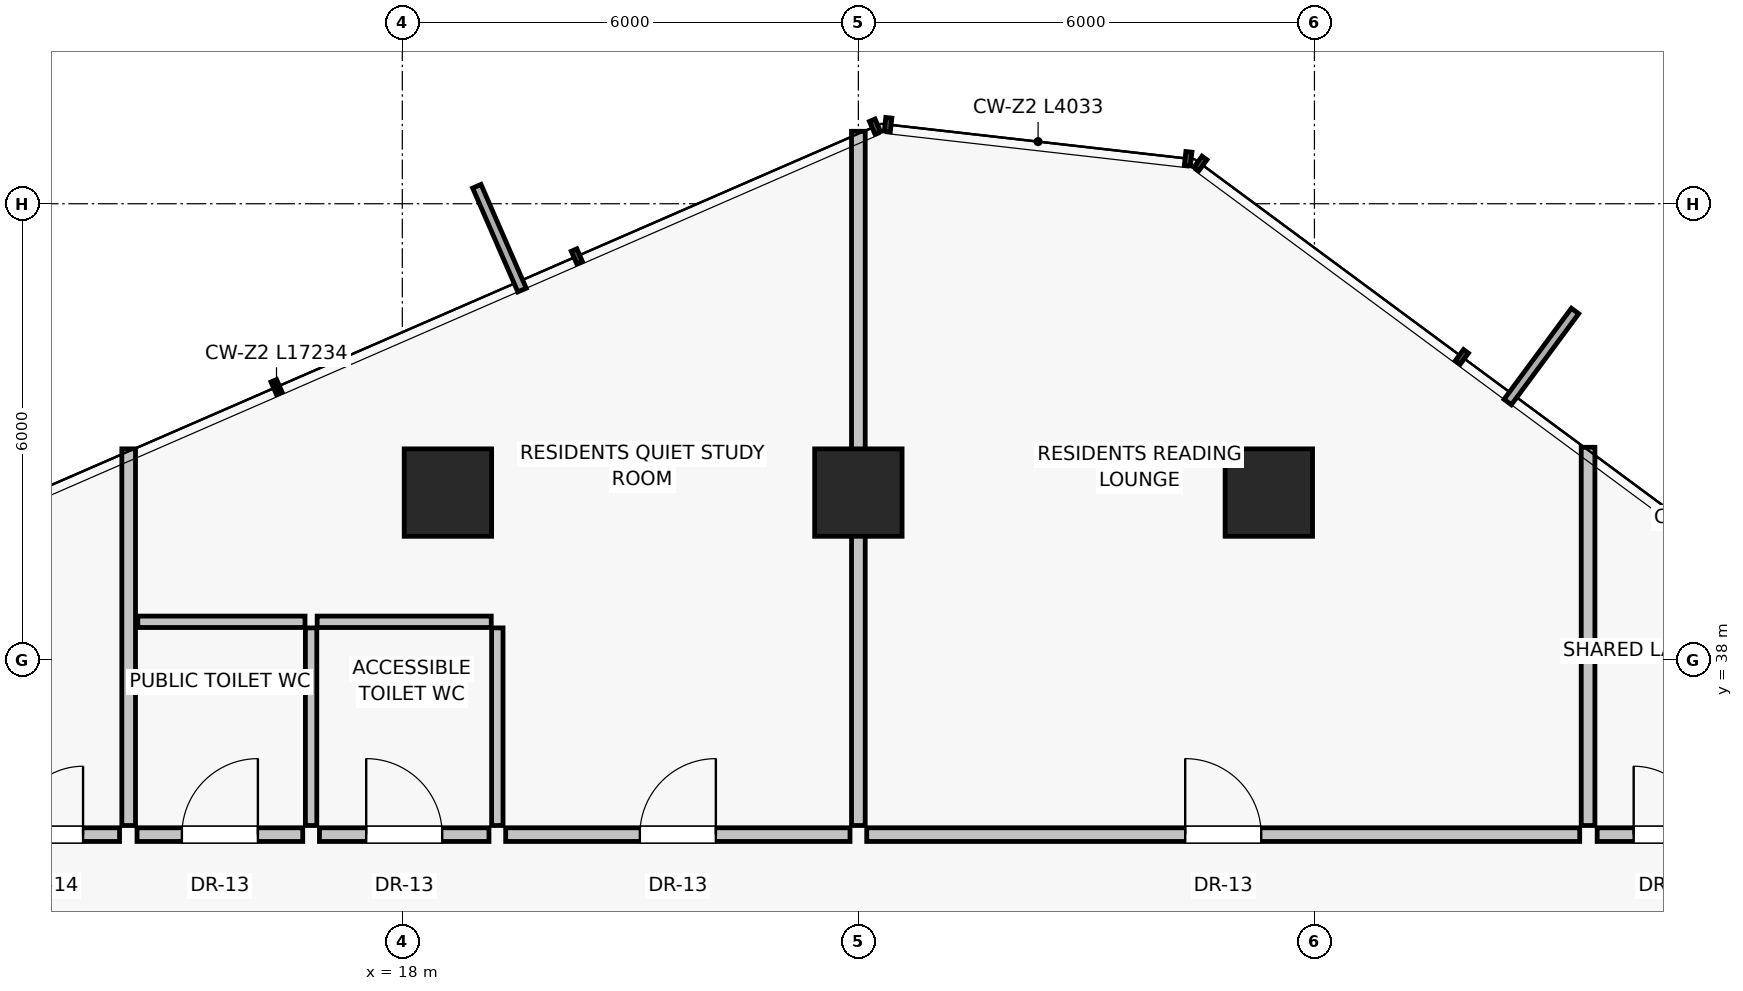
"""IFC4 building model, lengths in metres.
Left out: names, types, materials, properties, quantities, classifications, styles, units other than length and angle.
Written with IfcOpenShell. Run it as: python <this file> out.ifc"""

import sys

from ifc_helpers import new_model, si_unit, direction, frame, frame_2d, origin, origin_2d, place, context, subcontext, project, spatial, rectangle, extrude, source, transform, mapped, element, fill, save


model = new_model("IFC4")
c1 = context("Model", 3, precision=1e-05, world=origin(), true_north=direction((0.0, 1.0)))
c2 = subcontext(c1, "Body", "Model", "MODEL_VIEW")
j1 = project(units=[si_unit("LENGTHUNIT", "METRE"), si_unit("PLANEANGLEUNIT", "RADIAN")], contexts=[c1])
p1 = place(None, origin())
s1 = spatial("IfcSite", under=j1, at=p1, CompositionType="ELEMENT")
p2 = place(p1, origin())
s2 = spatial("IfcBuilding", under=s1, at=p2, CompositionType="ELEMENT")
p3 = place(p2, frame((0.0, 0.0, 105.7)))
s3 = spatial("IfcBuildingStorey", under=s2, at=p3, CompositionType="ELEMENT", Elevation=105.7)
for number, where, z_axis, x_axis in (
    (1, (29.4, 40.2, 0.0), (0.0, 0.0, 1.0), (1.0, 0.0, 0.0)),
    (2, (24.0, 40.2, 0.0), (0.0, 0.0, 1.0), (1.0, 0.0, 0.0)),
    (3, (18.6, 40.2, 0.0), (0.0, 0.0, 1.0), (1.0, 0.0, 0.0)),
):
    element("IfcColumn", number, at=place(p3, frame(where, z_axis=z_axis, x_axis=x_axis)), inside=s3, PredefinedType="COLUMN", context=c2, shape_type="SweptSolid", body=[
        extrude(rectangle(XDim=1.15, YDim=1.15, at=origin_2d()), origin(), (0.0, 0.0, 1.0), 3.25),
    ])
p4 = place(p3, frame((14.4, 35.82, 0.0), z_axis=(0.0, 0.0, 1.0), x_axis=(0.0, 1.0, 0.0)))
e4 = element("IfcWall", 4, at=p4, inside=s3, PredefinedType="PARTITIONING", context=c2, shape_type="SweptSolid", body=[
    extrude(rectangle(XDim=4.955, YDim=0.18, at=frame_2d((2.478, 0.0))), origin(), (0.0, 0.0, 1.0), 2.97),
])
p5 = place(p3, frame((33.6, 35.82, 0.0), z_axis=(0.0, 0.0, 1.0), x_axis=(0.0, 1.0, 0.0)))
e5 = element("IfcWall", 5, at=p5, inside=s3, PredefinedType="PARTITIONING", context=c2, shape_type="SweptSolid", body=[
    extrude(rectangle(XDim=4.976, YDim=0.18, at=frame_2d((2.488, 0.0))), origin(), (0.0, 0.0, 1.0), 2.97),
])
p6 = place(p3, frame((14.51, 35.7, 0.0), z_axis=(0.0, 0.0, 1.0), x_axis=(1.0, 0.0, 0.0)))
e6 = element("IfcWall", 6, at=p6, inside=s3, PredefinedType="PARTITIONING", context=c2, shape_type="SweptSolid", body=[
    extrude(rectangle(XDim=2.18, YDim=0.18, at=frame_2d((1.09, 0.0))), origin(), (0.0, 0.0, 1.0), 2.97),
])
p7 = place(p6, frame((0.59, 0.0, 0.0)))
e7 = element("IfcOpeningElement", 7, at=p7, cuts=e6, PredefinedType="OPENING", context=c2, shape_type="SweptSolid", body=[
    extrude(rectangle(XDim=1.0, YDim=2.01, at=frame_2d((0.5, 1.005))), frame((0.0, 0.1, 0.0), z_axis=(0.0, -1.0, 0.0), x_axis=(1.0, 0.0, 0.0)), (0.0, 0.0, 1.0), 0.2),
])
p8 = place(p3, frame((16.91, 35.7, 0.0), z_axis=(0.0, 0.0, 1.0), x_axis=(1.0, 0.0, 0.0)))
e8 = element("IfcWall", 8, at=p8, inside=s3, PredefinedType="PARTITIONING", context=c2, shape_type="SweptSolid", body=[
    extrude(rectangle(XDim=2.23, YDim=0.18, at=frame_2d((1.115, 0.0))), origin(), (0.0, 0.0, 1.0), 2.55),
])
p9 = place(p8, frame((0.615, 0.0, 0.0)))
e9 = element("IfcOpeningElement", 9, at=p9, cuts=e8, PredefinedType="OPENING", context=c2, shape_type="SweptSolid", body=[
    extrude(rectangle(XDim=1.0, YDim=2.01, at=frame_2d((0.5, 1.005))), frame((0.0, 0.1, 0.0), z_axis=(0.0, -1.0, 0.0), x_axis=(1.0, 0.0, 0.0)), (0.0, 0.0, 1.0), 0.2),
])
p10 = place(p3, frame((19.36, 35.7, 0.0), z_axis=(0.0, 0.0, 1.0), x_axis=(1.0, 0.0, 0.0)))
e10 = element("IfcWall", 10, at=p10, inside=s3, PredefinedType="PARTITIONING", context=c2, shape_type="SweptSolid", body=[
    extrude(rectangle(XDim=4.53, YDim=0.18, at=frame_2d((2.265, 0.0))), origin(), (0.0, 0.0, 1.0), 2.55),
])
p11 = place(p10, frame((1.765, 0.0, 0.0)))
e11 = element("IfcOpeningElement", 11, at=p11, cuts=e10, PredefinedType="OPENING", context=c2, shape_type="SweptSolid", body=[
    extrude(rectangle(XDim=1.0, YDim=2.01, at=frame_2d((0.5, 1.005))), frame((0.0, 0.1, 0.0), z_axis=(0.0, -1.0, 0.0), x_axis=(1.0, 0.0, 0.0)), (0.0, 0.0, 1.0), 0.2),
])
p12 = place(p3, frame((24.11, 35.7, 0.0), z_axis=(0.0, 0.0, 1.0), x_axis=(1.0, 0.0, 0.0)))
e12 = element("IfcWall", 12, at=p12, inside=s3, PredefinedType="PARTITIONING", context=c2, shape_type="SweptSolid", body=[
    extrude(rectangle(XDim=9.38, YDim=0.18, at=frame_2d((4.69, 0.0))), origin(), (0.0, 0.0, 1.0), 2.55),
])
p13 = place(p12, frame((4.19, 0.0, 0.0)))
e13 = element("IfcOpeningElement", 13, at=p13, cuts=e12, PredefinedType="OPENING", context=c2, shape_type="SweptSolid", body=[
    extrude(rectangle(XDim=1.0, YDim=2.01, at=frame_2d((0.5, 1.005))), frame((0.0, 0.1, 0.0), z_axis=(0.0, -1.0, 0.0), x_axis=(1.0, 0.0, 0.0)), (0.0, 0.0, 1.0), 0.2),
])
for number, where, z_axis, x_axis in (
    (14, (16.8, 35.82, 0.0), (0.0, 0.0, 1.0), (0.0, 1.0, 0.0)),
    (15, (19.25, 35.82, 0.0), (0.0, 0.0, 1.0), (0.0, 1.0, 0.0)),
):
    element("IfcWall", number, at=place(p3, frame(where, z_axis=z_axis, x_axis=x_axis)), inside=s3, PredefinedType="PARTITIONING", context=c2, shape_type="SweptSolid", body=[
        extrude(rectangle(XDim=2.6, YDim=0.15, at=frame_2d((1.3, 0.0))), origin(), (0.0, 0.0, 1.0), 2.97),
    ])
p14 = place(p3, frame((14.52, 38.5, 0.0), z_axis=(0.0, 0.0, 1.0), x_axis=(1.0, 0.0, 0.0)))
e16 = element("IfcWall", 16, at=p14, inside=s3, PredefinedType="PARTITIONING", context=c2, shape_type="SweptSolid", body=[
    extrude(rectangle(XDim=2.2, YDim=0.15, at=frame_2d((1.1, 0.0))), origin(), (0.0, 0.0, 1.0), 2.97),
])
p15 = place(p3, frame((16.88, 38.5, 0.0), z_axis=(0.0, 0.0, 1.0), x_axis=(1.0, 0.0, 0.0)))
e17 = element("IfcWall", 17, at=p15, inside=s3, PredefinedType="PARTITIONING", context=c2, shape_type="SweptSolid", body=[
    extrude(rectangle(XDim=2.29, YDim=0.15, at=frame_2d((1.145, 0.0))), origin(), (0.0, 0.0, 1.0), 2.97),
])
p16 = place(p3, frame((24.0, 35.82, 0.0), z_axis=(0.0, 0.0, 1.0), x_axis=(0.0, 1.0, 0.0)))
e18 = element("IfcWall", 18, at=p16, inside=s3, PredefinedType="PARTITIONING", context=c2, shape_type="SweptSolid", body=[
    extrude(rectangle(XDim=9.133, YDim=0.18, at=frame_2d((4.566, 0.0))), origin(), (0.0, 0.0, 1.0), 2.97),
])
p17 = place(p3, frame((12.42, 35.7, 0.0), z_axis=(0.0, 0.0, 1.0), x_axis=(1.0, 0.0, 0.0)))
e19 = element("IfcWall", 19, at=p17, inside=s3, PredefinedType="PARTITIONING", context=c2, shape_type="SweptSolid", body=[
    extrude(rectangle(XDim=1.86, YDim=0.18, at=frame_2d((0.93, 0.0))), origin(), (0.0, 0.0, 1.0), 2.97),
])
p18 = place(p17, frame((0.48, 0.0, 0.0)))
e20 = element("IfcOpeningElement", 20, at=p18, cuts=e19, PredefinedType="OPENING", context=c2, shape_type="SweptSolid", body=[
    extrude(rectangle(XDim=0.9, YDim=2.01, at=frame_2d((0.45, 1.005))), frame((0.0, 0.1, 0.0), z_axis=(0.0, -1.0, 0.0), x_axis=(1.0, 0.0, 0.0)), (0.0, 0.0, 1.0), 0.2),
])
p19 = place(p3, frame((33.72, 35.7, 0.0), z_axis=(0.0, 0.0, 1.0), x_axis=(1.0, 0.0, 0.0)))
e21 = element("IfcWall", 21, at=p19, inside=s3, PredefinedType="PARTITIONING", context=c2, shape_type="SweptSolid", body=[
    extrude(rectangle(XDim=1.86, YDim=0.18, at=frame_2d((0.93, 0.0))), origin(), (0.0, 0.0, 1.0), 2.97),
])
p20 = place(p19, frame((0.48, 0.0, 0.0)))
e22 = element("IfcOpeningElement", 22, at=p20, cuts=e21, PredefinedType="OPENING", context=c2, shape_type="SweptSolid", body=[
    extrude(rectangle(XDim=0.9, YDim=2.01, at=frame_2d((0.45, 1.005))), frame((0.0, 0.1, 0.0), z_axis=(0.0, -1.0, 0.0), x_axis=(1.0, 0.0, 0.0)), (0.0, 0.0, 1.0), 0.2),
])
m1 = source(origin(), c2, "Body", "SweptSolid", [
    extrude(rectangle(XDim=1.0, YDim=2.01, at=frame_2d((0.5, 1.005))), frame((0.0, 0.025, 0.0), z_axis=(0.0, -1.0, 0.0), x_axis=(1.0, 0.0, 0.0)), (0.0, 0.0, 1.0), 0.05),
])
p21 = place(p7, origin())
e23 = element("IfcDoor", 23, at=p21, inside=s3, OperationType="SINGLE_SWING_RIGHT", PredefinedType="DOOR", context=c2, shape_type="MappedRepresentation", body=[
    mapped(m1, transform((0.0, 0.0, 0.0), scale=1.0)),
])
fill(e7, e23)
p22 = place(p9, origin())
e24 = element("IfcDoor", 24, at=p22, inside=s3, OperationType="SINGLE_SWING_LEFT", PredefinedType="DOOR", context=c2, shape_type="MappedRepresentation", body=[
    mapped(m1, transform((0.0, 0.0, 0.0), scale=1.0)),
])
fill(e9, e24)
p23 = place(p11, origin())
e25 = element("IfcDoor", 25, at=p23, inside=s3, OperationType="SINGLE_SWING_RIGHT", PredefinedType="DOOR", context=c2, shape_type="MappedRepresentation", body=[
    mapped(m1, transform((0.0, 0.0, 0.0), scale=1.0)),
])
fill(e11, e25)
p24 = place(p13, origin())
e26 = element("IfcDoor", 26, at=p24, inside=s3, OperationType="SINGLE_SWING_LEFT", PredefinedType="DOOR", context=c2, shape_type="MappedRepresentation", body=[
    mapped(m1, transform((0.0, 0.0, 0.0), scale=1.0)),
])
fill(e13, e26)
m2 = source(origin(), c2, "Body", "SweptSolid", [
    extrude(rectangle(XDim=0.9, YDim=2.01, at=frame_2d((0.45, 1.005))), frame((0.0, 0.025, 0.0), z_axis=(0.0, -1.0, 0.0), x_axis=(1.0, 0.0, 0.0)), (0.0, 0.0, 1.0), 0.05),
])
p25 = place(p18, origin())
e27 = element("IfcDoor", 27, at=p25, inside=s3, OperationType="SINGLE_SWING_RIGHT", PredefinedType="DOOR", context=c2, shape_type="MappedRepresentation", body=[
    mapped(m2, transform((0.0, 0.0, 0.0), scale=1.0)),
])
fill(e20, e27)
p26 = place(p20, origin())
e28 = element("IfcDoor", 28, at=p26, inside=s3, OperationType="SINGLE_SWING_LEFT", PredefinedType="DOOR", context=c2, shape_type="MappedRepresentation", body=[
    mapped(m2, transform((0.0, 0.0, 0.0), scale=1.0)),
])
fill(e22, e28)
save(model, sys.argv[1])
